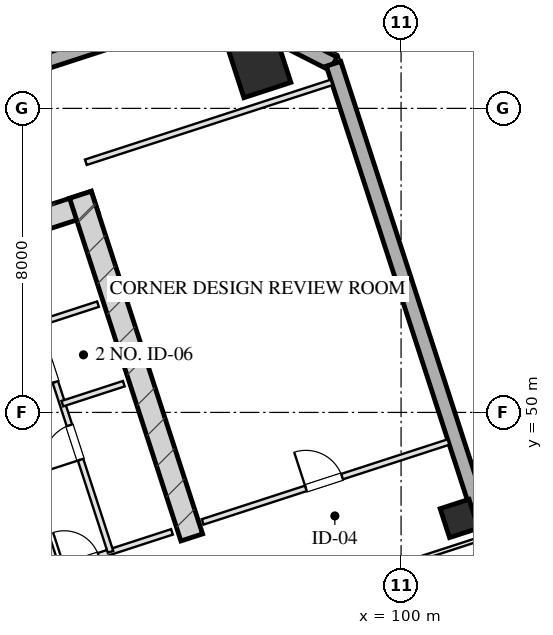
"""IFC4 building model, lengths in metres.
Left out: names, types, materials, properties, quantities, classifications, styles, units other than length and angle.
Written with IfcOpenShell. Run it as: python <this file> out.ifc"""

import sys

from ifc_helpers import new_model, si_unit, direction, frame, frame_2d, origin, origin_2d, place, context, subcontext, project, spatial, rectangle, hollow_rectangle, extrude, element, fill, save


model = new_model("IFC4")
c1 = context("Model", 3, precision=1e-05, world=origin(), true_north=direction((0.0, 1.0)))
c2 = subcontext(c1, "Body", "Model", "MODEL_VIEW")
j1 = project(units=[si_unit("LENGTHUNIT", "METRE"), si_unit("PLANEANGLEUNIT", "RADIAN")], contexts=[c1])
p1 = place(None, origin())
s1 = spatial("IfcSite", under=j1, at=p1, CompositionType="ELEMENT")
p2 = place(p1, origin())
s2 = spatial("IfcBuilding", under=s1, at=p2, CompositionType="ELEMENT")
p3 = place(p2, frame((0.0, 0.0, 146.05)))
s3 = spatial("IfcBuildingStorey", under=s2, at=p3, CompositionType="ELEMENT", Elevation=146.05)
p4 = place(p3, frame((76.344, 50.466, 0.0), z_axis=(0.0, 0.0, 1.0), x_axis=(0.951055727519, 0.309019421968, 0.0)))
e1 = element("IfcWall", 1, at=p4, inside=s3, PredefinedType="SHEAR", context=c2, shape_type="SweptSolid", body=[
    extrude(rectangle(XDim=16.4, YDim=0.6, at=frame_2d((8.2, 0.0))), origin(), (0.0, 0.0, 1.0), 3.45),
])
p5 = place(p3, frame((94.492, 46.71, 0.0), z_axis=(0.0, 0.0, 1.0), x_axis=(-0.309010370028, 0.95105866865, 0.0)))
e2 = element("IfcWall", 2, at=p5, inside=s3, PredefinedType="SHEAR", context=c2, shape_type="SweptSolid", body=[
    extrude(rectangle(XDim=9.48, YDim=0.6, at=frame_2d((4.74, 0.0))), origin(), (0.0, 0.0, 1.0), 3.45),
])
p6 = place(p3, frame((96.281, 59.099, 0.0), z_axis=(0.0, 0.0, 1.0), x_axis=(0.951056516295, 0.309016994375, 0.0)))
e3 = element("IfcColumn", 3, at=p6, inside=s3, PredefinedType="COLUMN", context=c2, shape_type="SweptSolid", body=[
    extrude(hollow_rectangle(XDim=1.3, YDim=1.3, WallThickness=0.045, at=origin_2d()), origin(), (0.0, 0.0, 1.0), 3.451),
])
p7 = place(p3, frame((101.532, 47.21, 0.0), z_axis=(0.0, 0.0, 1.0), x_axis=(0.951056516295, 0.309016994375, 0.0)))
e4 = element("IfcColumn", 4, at=p7, inside=s3, PredefinedType="COLUMN", context=c2, shape_type="SweptSolid", body=[
    extrude(hollow_rectangle(XDim=0.8, YDim=0.8, WallThickness=0.028, at=origin_2d()), origin(), (0.0, 0.0, 1.0), 3.451),
])
p8 = place(p3, frame((70.092, 52.556, 0.0), z_axis=(0.0, 0.0, 1.0), x_axis=(0.951057580055, 0.30901372044, 0.0)))
e5 = element("IfcWall", 5, at=p8, inside=s3, PredefinedType="SOLIDWALL", context=c2, shape_type="SweptSolid", body=[
    extrude(rectangle(XDim=26.4, YDim=0.4, at=frame_2d((13.2, 0.0))), origin(), (0.0, 0.0, 1.0), 2.61),
])
p9 = place(p3, frame((95.199, 60.714, 0.0), z_axis=(0.0, 0.0, 1.0), x_axis=(0.891020832027, -0.453962417932, 0.0)))
e6 = element("IfcWall", 6, at=p9, inside=s3, PredefinedType="SOLIDWALL", context=c2, shape_type="SweptSolid", body=[
    extrude(rectangle(XDim=3.394, YDim=0.4, at=frame_2d((1.697, 0.0))), origin(), (0.0, 0.0, 1.0), 2.61),
])
p10 = place(p3, frame((98.224, 59.173, 0.0), z_axis=(0.0, 0.0, 1.0), x_axis=(0.309014228706, -0.951057414911, 0.0)))
e7 = element("IfcWall", 7, at=p10, inside=s3, PredefinedType="SOLIDWALL", context=c2, shape_type="SweptSolid", body=[
    extrude(rectangle(XDim=42.8, YDim=0.4, at=frame_2d((21.4, 0.0))), origin(), (0.0, 0.0, 1.0), 2.61),
])
p11 = place(p10, frame((13.875, 0.0, 0.75)))
e8 = element("IfcOpeningElement", 8, at=p11, cuts=e7, PredefinedType="OPENING", context=c2, shape_type="SweptSolid", body=[
    extrude(rectangle(XDim=2.25, YDim=1.46, at=frame_2d((1.125, 0.73))), frame((0.0, 0.21, 0.0), z_axis=(0.0, -1.0, 0.0), x_axis=(1.0, 0.0, 0.0)), (0.0, 0.0, 1.0), 0.42),
])
p12 = place(p10, frame((26.65, 0.0, 0.0)))
e9 = element("IfcOpeningElement", 9, at=p12, cuts=e7, PredefinedType="OPENING", context=c2, shape_type="SweptSolid", body=[
    extrude(rectangle(XDim=1.1, YDim=2.15, at=frame_2d((0.55, 1.075))), frame((0.0, 0.21, 0.0), z_axis=(0.0, -1.0, 0.0), x_axis=(1.0, 0.0, 0.0)), (0.0, 0.0, 1.0), 0.42),
])
p13 = place(p3, frame((90.928, 45.868, 0.0), z_axis=(0.0, 0.0, 1.0), x_axis=(-0.309042196757, 0.951048327176, 0.0)))
e10 = element("IfcWall", 10, at=p13, inside=s3, PredefinedType="PARTITIONING", context=c2, shape_type="SweptSolid", body=[
    extrude(rectangle(XDim=8.43, YDim=0.2, at=frame_2d((4.215, 0.0))), origin(), (0.0, 0.0, 1.0), 3.175),
])
p14 = place(p3, frame((90.928, 45.868, 0.0), z_axis=(0.0, 0.0, 1.0), x_axis=(0.951059297078, 0.309008435874, 0.0)))
e11 = element("IfcWall", 11, at=p14, inside=s3, PredefinedType="PARTITIONING", context=c2, shape_type="SweptSolid", body=[
    extrude(rectangle(XDim=3.2, YDim=0.15, at=frame_2d((1.6, 0.0))), origin(), (0.0, 0.0, 1.0), 3.175),
])
p15 = place(p14, frame((0.22, 0.0, 0.0)))
e12 = element("IfcOpeningElement", 12, at=p15, cuts=e11, PredefinedType="OPENING", context=c2, shape_type="SweptSolid", body=[
    extrude(rectangle(XDim=0.95, YDim=2.05, at=frame_2d((0.475, 1.025))), frame((0.0, 0.085, 0.0), z_axis=(0.0, -1.0, 0.0), x_axis=(1.0, 0.0, 0.0)), (0.0, 0.0, 1.0), 0.17),
])
p16 = place(p3, frame((92.355, 46.331, 0.0), z_axis=(0.0, 0.0, 1.0), x_axis=(-0.309007490203, 0.951059604335, 0.0)))
e13 = element("IfcWall", 13, at=p16, inside=s3, PredefinedType="PARTITIONING", context=c2, shape_type="SweptSolid", body=[
    extrude(rectangle(XDim=8.43, YDim=0.15, at=frame_2d((4.215, 0.0))), origin(), (0.0, 0.0, 1.0), 3.175),
])
p17 = place(p16, frame((2.55, 0.0, 0.0)))
e14 = element("IfcOpeningElement", 14, at=p17, cuts=e13, PredefinedType="OPENING", context=c2, shape_type="SweptSolid", body=[
    extrude(rectangle(XDim=0.95, YDim=2.05, at=frame_2d((0.475, 1.025))), frame((0.0, 0.085, 0.0), z_axis=(0.0, -1.0, 0.0), x_axis=(1.0, 0.0, 0.0)), (0.0, 0.0, 1.0), 0.17),
])
p18 = place(p16, frame((4.7, 0.0, 0.0)))
e15 = element("IfcOpeningElement", 15, at=p18, cuts=e13, PredefinedType="OPENING", context=c2, shape_type="SweptSolid", body=[
    extrude(rectangle(XDim=0.9, YDim=2.05, at=frame_2d((0.45, 1.025))), frame((0.0, 0.085, 0.0), z_axis=(0.0, -1.0, 0.0), x_axis=(1.0, 0.0, 0.0)), (0.0, 0.0, 1.0), 0.17),
])
p19 = place(p16, frame((6.8, 0.0, 0.0)))
e16 = element("IfcOpeningElement", 16, at=p19, cuts=e13, PredefinedType="OPENING", context=c2, shape_type="SweptSolid", body=[
    extrude(rectangle(XDim=0.9, YDim=2.05, at=frame_2d((0.45, 1.025))), frame((0.0, 0.085, 0.0), z_axis=(0.0, -1.0, 0.0), x_axis=(1.0, 0.0, 0.0)), (0.0, 0.0, 1.0), 0.17),
])
p20 = place(p3, frame((91.088, 50.23, 0.0), z_axis=(0.0, 0.0, 1.0), x_axis=(0.951054116971, 0.309024378638, 0.0)))
e17 = element("IfcWall", 17, at=p20, inside=s3, PredefinedType="PARTITIONING", context=c2, shape_type="SweptSolid", body=[
    extrude(rectangle(XDim=1.7, YDim=0.15, at=frame_2d((0.85, 0.0))), origin(), (0.0, 0.0, 1.0), 3.175),
])
p21 = place(p3, frame((90.408, 52.323, 0.0), z_axis=(0.0, 0.0, 1.0), x_axis=(0.951040401051, 0.309066587596, 0.0)))
e18 = element("IfcWall", 18, at=p21, inside=s3, PredefinedType="PARTITIONING", context=c2, shape_type="SweptSolid", body=[
    extrude(rectangle(XDim=1.7, YDim=0.15, at=frame_2d((0.85, 0.0))), origin(), (0.0, 0.0, 1.0), 3.175),
])
p22 = place(p3, frame((91.705, 56.582, 0.0), z_axis=(0.0, 0.0, 1.0), x_axis=(0.951057811516, 0.309013008068, 0.0)))
e19 = element("IfcWall", 19, at=p22, inside=s3, PredefinedType="PARTITIONING", context=c2, shape_type="SweptSolid", body=[
    extrude(rectangle(XDim=6.8, YDim=0.15, at=frame_2d((3.4, 0.0))), origin(), (0.0, 0.0, 1.0), 3.175),
])
p23 = place(p3, frame((94.78, 47.119, 0.0), z_axis=(0.0, 0.0, 1.0), x_axis=(0.951057811516, 0.309013008068, 0.0)))
e20 = element("IfcWall", 20, at=p23, inside=s3, PredefinedType="PARTITIONING", context=c2, shape_type="SweptSolid", body=[
    extrude(rectangle(XDim=6.8, YDim=0.15, at=frame_2d((3.4, 0.0))), origin(), (0.0, 0.0, 1.0), 3.175),
])
p24 = place(p23, frame((2.856, 0.0, 0.0)))
e21 = element("IfcOpeningElement", 21, at=p24, cuts=e20, PredefinedType="OPENING", context=c2, shape_type="SweptSolid", body=[
    extrude(rectangle(XDim=1.0, YDim=2.05, at=frame_2d((0.5, 1.025))), frame((0.0, 0.085, 0.0), z_axis=(0.0, -1.0, 0.0), x_axis=(1.0, 0.0, 0.0)), (0.0, 0.0, 1.0), 0.17),
])
p25 = place(p3, frame((90.425, 42.886, 0.0), z_axis=(0.0, 0.0, 1.0), x_axis=(0.95105749975, 0.309013967595, 0.0)))
e22 = element("IfcWall", 22, at=p25, inside=s3, PredefinedType="MOVABLE", context=c2, shape_type="SweptSolid", body=[
    extrude(rectangle(XDim=12.25, YDim=0.1, at=frame_2d((6.125, 0.0))), origin(), (0.0, 0.0, 1.0), 3.175),
])
p26 = place(p15, origin())
e23 = element("IfcDoor", 23, at=p26, inside=s3, OperationType="SINGLE_SWING_LEFT", PredefinedType="DOOR", context=c2, shape_type="SweptSolid", body=[
    extrude(rectangle(XDim=0.95, YDim=2.05, at=frame_2d((0.475, 1.025))), frame((0.0, 0.025, 0.0), z_axis=(0.0, -1.0, 0.0), x_axis=(1.0, 0.0, 0.0)), (0.0, 0.0, 1.0), 0.05),
])
fill(e12, e23)
p27 = place(p17, origin())
e24 = element("IfcDoor", 24, at=p27, inside=s3, OperationType="SINGLE_SWING_LEFT", PredefinedType="DOOR", context=c2, shape_type="SweptSolid", body=[
    extrude(rectangle(XDim=0.95, YDim=2.05, at=frame_2d((0.475, 1.025))), frame((0.0, 0.025, 0.0), z_axis=(0.0, -1.0, 0.0), x_axis=(1.0, 0.0, 0.0)), (0.0, 0.0, 1.0), 0.05),
])
fill(e14, e24)
p28 = place(p18, origin())
e25 = element("IfcDoor", 25, at=p28, inside=s3, OperationType="SINGLE_SWING_LEFT", PredefinedType="DOOR", context=c2, shape_type="SweptSolid", body=[
    extrude(rectangle(XDim=0.9, YDim=2.05, at=frame_2d((0.45, 1.025))), frame((0.0, 0.025, 0.0), z_axis=(0.0, -1.0, 0.0), x_axis=(1.0, 0.0, 0.0)), (0.0, 0.0, 1.0), 0.05),
])
fill(e15, e25)
p29 = place(p24, origin())
e26 = element("IfcDoor", 26, at=p29, inside=s3, OperationType="SINGLE_SWING_LEFT", PredefinedType="DOOR", context=c2, shape_type="SweptSolid", body=[
    extrude(rectangle(XDim=1.0, YDim=2.05, at=frame_2d((0.5, 1.025))), frame((0.0, 0.025, 0.0), z_axis=(0.0, -1.0, 0.0), x_axis=(1.0, 0.0, 0.0)), (0.0, 0.0, 1.0), 0.05),
])
fill(e21, e26)
save(model, sys.argv[1])
